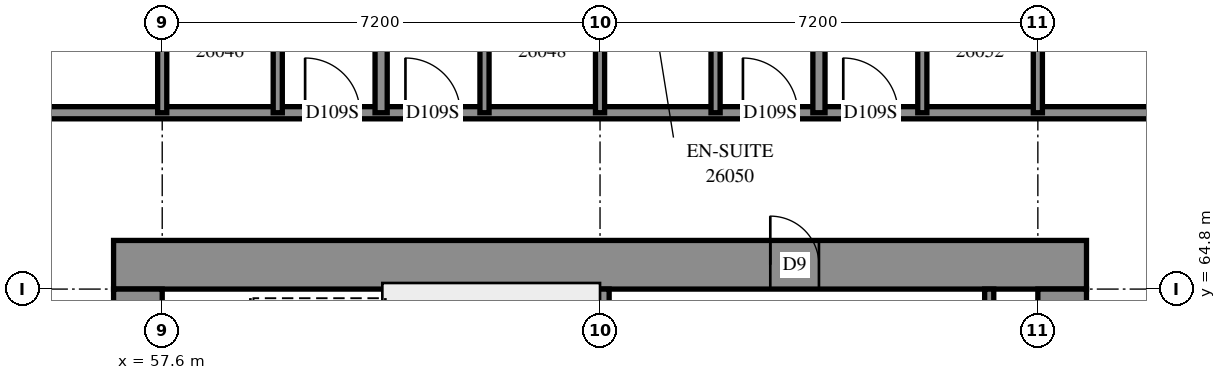
"""IFC4 building model, lengths in metres.
Left out: names, types, materials, properties, quantities, classifications, styles, units other than length and angle.
Written with IfcOpenShell. Run it as: python <this file> out.ifc"""

import sys

from ifc_helpers import new_model, si_unit, direction, frame, frame_2d, origin, place, context, subcontext, project, spatial, rectangle, extrude, element, fill, save


model = new_model("IFC4")
c1 = context("Model", 3, precision=1e-05, world=origin(), true_north=direction((0.0, 1.0)))
c2 = subcontext(c1, "Body", "Model", "MODEL_VIEW")
j1 = project(units=[si_unit("LENGTHUNIT", "METRE"), si_unit("PLANEANGLEUNIT", "RADIAN")], contexts=[c1])
p1 = place(None, origin())
s1 = spatial("IfcSite", under=j1, at=p1, CompositionType="ELEMENT")
p2 = place(p1, origin())
s2 = spatial("IfcBuilding", under=s1, at=p2, CompositionType="ELEMENT")
p3 = place(p2, frame((0.0, 0.0, 98.2)))
s3 = spatial("IfcBuildingStorey", under=s2, at=p3, CompositionType="ELEMENT", Elevation=98.2)
p4 = place(p3, frame((56.8, 65.2, -0.3), z_axis=(0.0, 0.0, 1.0), x_axis=(1.0, 0.0, 0.0)))
e1 = element("IfcWall", 1, at=p4, inside=s3, PredefinedType="SHEAR", context=c2, shape_type="SweptSolid", body=[
    extrude(rectangle(XDim=16.0, YDim=0.8, at=frame_2d((8.0, 0.0))), origin(), (0.0, 0.0, 1.0), 2.7),
])
p5 = place(p4, frame((10.8, 0.0, 0.3)))
e2 = element("IfcOpeningElement", 2, at=p5, cuts=e1, PredefinedType="OPENING", context=c2, shape_type="SweptSolid", body=[
    extrude(rectangle(XDim=0.8, YDim=2.1, at=frame_2d((0.4, 1.05))), frame((0.0, 0.41, 0.0), z_axis=(0.0, -1.0, 0.0), x_axis=(1.0, 0.0, 0.0)), (0.0, 0.0, 1.0), 0.82),
])
p6 = place(p3, frame((57.2, 50.4, -0.3), z_axis=(0.0, 0.0, 1.0), x_axis=(0.0, 1.0, 0.0)))
e3 = element("IfcWall", 3, at=p6, inside=s3, PredefinedType="SHEAR", context=c2, shape_type="SweptSolid", body=[
    extrude(rectangle(XDim=14.4, YDim=0.8, at=frame_2d((7.2, 0.0))), origin(), (0.0, 0.0, 1.0), 2.7),
])
p7 = place(p6, frame((4.55, 0.0, 0.3)))
e4 = element("IfcOpeningElement", 4, at=p7, cuts=e3, PredefinedType="OPENING", context=c2, shape_type="SweptSolid", body=[
    extrude(rectangle(XDim=1.1, YDim=2.1, at=frame_2d((0.55, 1.05))), frame((0.0, 0.41, 0.0), z_axis=(0.0, -1.0, 0.0), x_axis=(1.0, 0.0, 0.0)), (0.0, 0.0, 1.0), 0.82),
])
p8 = place(p6, frame((11.35, 0.0, 0.3)))
e5 = element("IfcOpeningElement", 5, at=p8, cuts=e3, PredefinedType="OPENING", context=c2, shape_type="SweptSolid", body=[
    extrude(rectangle(XDim=1.1, YDim=2.1, at=frame_2d((0.55, 1.05))), frame((0.0, 0.41, 0.0), z_axis=(0.0, -1.0, 0.0), x_axis=(1.0, 0.0, 0.0)), (0.0, 0.0, 1.0), 0.82),
])
p9 = place(p3, frame((72.4, 50.4, -0.3), z_axis=(0.0, 0.0, 1.0), x_axis=(0.0, 1.0, 0.0)))
e6 = element("IfcWall", 6, at=p9, inside=s3, PredefinedType="SHEAR", context=c2, shape_type="SweptSolid", body=[
    extrude(rectangle(XDim=14.4, YDim=0.8, at=frame_2d((7.2, 0.0))), origin(), (0.0, 0.0, 1.0), 2.7),
])
p10 = place(p9, frame((4.55, 0.0, 0.3)))
e7 = element("IfcOpeningElement", 7, at=p10, cuts=e6, PredefinedType="OPENING", context=c2, shape_type="SweptSolid", body=[
    extrude(rectangle(XDim=1.1, YDim=2.1, at=frame_2d((0.55, 1.05))), frame((0.0, 0.41, 0.0), z_axis=(0.0, -1.0, 0.0), x_axis=(1.0, 0.0, 0.0)), (0.0, 0.0, 1.0), 0.82),
])
p11 = place(p9, frame((11.35, 0.0, 0.3)))
e8 = element("IfcOpeningElement", 8, at=p11, cuts=e6, PredefinedType="OPENING", context=c2, shape_type="SweptSolid", body=[
    extrude(rectangle(XDim=1.1, YDim=2.1, at=frame_2d((0.55, 1.05))), frame((0.0, 0.41, 0.0), z_axis=(0.0, -1.0, 0.0), x_axis=(1.0, 0.0, 0.0)), (0.0, 0.0, 1.0), 0.82),
])
p12 = place(p3, frame((64.8, 60.6, 0.0), z_axis=(0.0, 0.0, 1.0), x_axis=(0.0, 1.0, 0.0)))
e9 = element("IfcWall", 9, at=p12, inside=s3, PredefinedType="SOLIDWALL", context=c2, shape_type="SweptSolid", body=[
    extrude(rectangle(XDim=4.2, YDim=0.3, at=frame_2d((2.1, 0.0))), origin(), (0.0, 0.0, 1.0), 3.1),
])
p13 = place(p3, frame((71.2, 63.78, 0.0), z_axis=(0.0, 0.0, 1.0), x_axis=(0.0, 1.0, 0.0)))
e10 = element("IfcWall", 10, at=p13, inside=s3, PredefinedType="PARTITIONING", context=c2, shape_type="SweptSolid", body=[
    extrude(rectangle(XDim=1.02, YDim=0.15, at=frame_2d((0.51, 0.0))), origin(), (0.0, 0.0, 1.0), 3.1),
])
p14 = place(p3, frame((54.7, 67.7, 0.0), z_axis=(0.0, 0.0, 1.0), x_axis=(1.0, 0.0, 0.0)))
e11 = element("IfcWall", 11, at=p14, inside=s3, PredefinedType="PARTITIONING", context=c2, shape_type="SweptSolid", body=[
    extrude(rectangle(XDim=20.2, YDim=0.2, at=frame_2d((10.1, 0.0))), origin(), (0.0, 0.0, 1.0), 3.1),
])
p15 = place(p14, frame((5.25, 0.0, 0.0)))
e12 = element("IfcOpeningElement", 12, at=p15, cuts=e11, PredefinedType="OPENING", context=c2, shape_type="SweptSolid", body=[
    extrude(rectangle(XDim=0.9, YDim=2.1, at=frame_2d((0.45, 1.05))), frame((0.0, 0.11, 0.0), z_axis=(0.0, -1.0, 0.0), x_axis=(1.0, 0.0, 0.0)), (0.0, 0.0, 1.0), 0.22),
])
p16 = place(p14, frame((6.9, 0.0, 0.0)))
e13 = element("IfcOpeningElement", 13, at=p16, cuts=e11, PredefinedType="OPENING", context=c2, shape_type="SweptSolid", body=[
    extrude(rectangle(XDim=0.9, YDim=2.1, at=frame_2d((0.45, 1.05))), frame((0.0, 0.11, 0.0), z_axis=(0.0, -1.0, 0.0), x_axis=(1.0, 0.0, 0.0)), (0.0, 0.0, 1.0), 0.22),
])
p17 = place(p14, frame((12.45, 0.0, 0.0)))
e14 = element("IfcOpeningElement", 14, at=p17, cuts=e11, PredefinedType="OPENING", context=c2, shape_type="SweptSolid", body=[
    extrude(rectangle(XDim=0.9, YDim=2.1, at=frame_2d((0.45, 1.05))), frame((0.0, 0.11, 0.0), z_axis=(0.0, -1.0, 0.0), x_axis=(1.0, 0.0, 0.0)), (0.0, 0.0, 1.0), 0.22),
])
p18 = place(p14, frame((14.1, 0.0, 0.0)))
e15 = element("IfcOpeningElement", 15, at=p18, cuts=e11, PredefinedType="OPENING", context=c2, shape_type="SweptSolid", body=[
    extrude(rectangle(XDim=0.9, YDim=2.1, at=frame_2d((0.45, 1.05))), frame((0.0, 0.11, 0.0), z_axis=(0.0, -1.0, 0.0), x_axis=(1.0, 0.0, 0.0)), (0.0, 0.0, 1.0), 0.22),
])
p19 = place(p3, frame((68.4, 67.7, 0.0), z_axis=(0.0, 0.0, 1.0), x_axis=(0.0, 1.0, 0.0)))
e16 = element("IfcWall", 16, at=p19, inside=s3, PredefinedType="PARTITIONING", context=c2, shape_type="SweptSolid", body=[
    extrude(rectangle(XDim=4.986, YDim=0.2, at=frame_2d((2.493, 0.0))), origin(), (0.0, 0.0, 1.0), 3.1),
])
p20 = place(p3, frame((61.2, 67.7, 0.0), z_axis=(0.0, 0.0, 1.0), x_axis=(0.0, 1.0, 0.0)))
e17 = element("IfcWall", 17, at=p20, inside=s3, PredefinedType="PARTITIONING", context=c2, shape_type="SweptSolid", body=[
    extrude(rectangle(XDim=4.954, YDim=0.2, at=frame_2d((2.477, 0.0))), origin(), (0.0, 0.0, 1.0), 3.1),
])
for number, where, z_axis, x_axis in (
    (18, (59.5, 67.7, 0.0), (0.0, 0.0, 1.0), (0.0, 1.0, 0.0)),
    (19, (57.6, 67.7, 0.0), (0.0, 0.0, 1.0), (0.0, 1.0, 0.0)),
    (20, (62.9, 67.7, 0.0), (0.0, 0.0, 1.0), (0.0, 1.0, 0.0)),
    (21, (64.8, 67.7, 0.0), (0.0, 0.0, 1.0), (0.0, 1.0, 0.0)),
    (22, (66.7, 67.7, 0.0), (0.0, 0.0, 1.0), (0.0, 1.0, 0.0)),
    (23, (70.1, 67.7, 0.0), (0.0, 0.0, 1.0), (0.0, 1.0, 0.0)),
    (24, (72.0, 67.7, 0.0), (0.0, 0.0, 1.0), (0.0, 1.0, 0.0)),
):
    element("IfcWall", number, at=place(p3, frame(where, z_axis=z_axis, x_axis=x_axis)), inside=s3, PredefinedType="PARTITIONING", context=c2, shape_type="SweptSolid", body=[
        extrude(rectangle(XDim=2.4, YDim=0.15, at=frame_2d((1.2, 0.0))), origin(), (0.0, 0.0, 1.0), 3.1),
    ])
p21 = place(p5, origin())
e25 = element("IfcDoor", 25, at=p21, inside=s3, OperationType="SINGLE_SWING_RIGHT", PredefinedType="DOOR", context=c2, shape_type="SweptSolid", body=[
    extrude(rectangle(XDim=0.8, YDim=2.1, at=frame_2d((0.4, 1.05))), frame((0.0, -0.34, 0.0), z_axis=(0.0, -1.0, 0.0), x_axis=(1.0, 0.0, 0.0)), (0.0, 0.0, 1.0), 0.05),
])
fill(e2, e25)
p22 = place(p15, origin())
e26 = element("IfcDoor", 26, at=p22, inside=s3, OperationType="SINGLE_SWING_RIGHT", PredefinedType="DOOR", context=c2, shape_type="SweptSolid", body=[
    extrude(rectangle(XDim=0.9, YDim=2.1, at=frame_2d((0.45, 1.05))), frame((0.0, 0.025, 0.0), z_axis=(0.0, -1.0, 0.0), x_axis=(1.0, 0.0, 0.0)), (0.0, 0.0, 1.0), 0.05),
])
fill(e12, e26)
p23 = place(p16, origin())
e27 = element("IfcDoor", 27, at=p23, inside=s3, OperationType="SINGLE_SWING_LEFT", PredefinedType="DOOR", context=c2, shape_type="SweptSolid", body=[
    extrude(rectangle(XDim=0.9, YDim=2.1, at=frame_2d((0.45, 1.05))), frame((0.0, 0.025, 0.0), z_axis=(0.0, -1.0, 0.0), x_axis=(1.0, 0.0, 0.0)), (0.0, 0.0, 1.0), 0.05),
])
fill(e13, e27)
p24 = place(p17, origin())
e28 = element("IfcDoor", 28, at=p24, inside=s3, OperationType="SINGLE_SWING_RIGHT", PredefinedType="DOOR", context=c2, shape_type="SweptSolid", body=[
    extrude(rectangle(XDim=0.9, YDim=2.1, at=frame_2d((0.45, 1.05))), frame((0.0, 0.025, 0.0), z_axis=(0.0, -1.0, 0.0), x_axis=(1.0, 0.0, 0.0)), (0.0, 0.0, 1.0), 0.05),
])
fill(e14, e28)
p25 = place(p18, origin())
e29 = element("IfcDoor", 29, at=p25, inside=s3, OperationType="SINGLE_SWING_LEFT", PredefinedType="DOOR", context=c2, shape_type="SweptSolid", body=[
    extrude(rectangle(XDim=0.9, YDim=2.1, at=frame_2d((0.45, 1.05))), frame((0.0, 0.025, 0.0), z_axis=(0.0, -1.0, 0.0), x_axis=(1.0, 0.0, 0.0)), (0.0, 0.0, 1.0), 0.05),
])
fill(e15, e29)
save(model, sys.argv[1])
